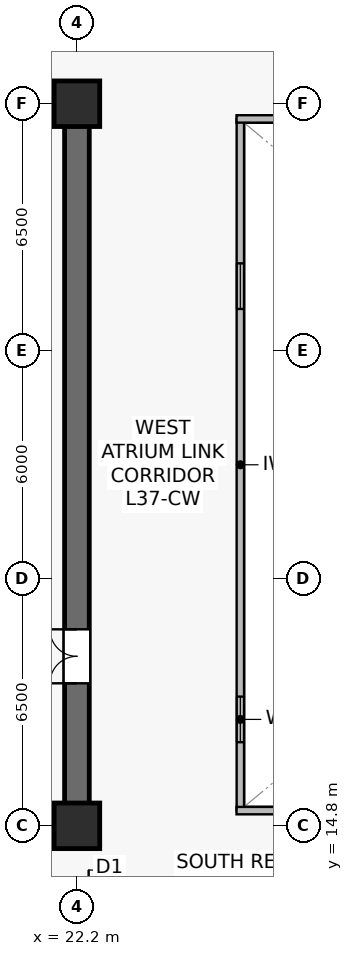
"""IFC4 building model, lengths in metres.
Left out: names, types, materials, properties, quantities, classifications, styles, units other than length and angle.
Written with IfcOpenShell. Run it as: python <this file> out.ifc"""

import sys

from ifc_helpers import new_model, si_unit, direction, frame, frame_2d, origin, origin_2d, place, context, subcontext, project, spatial, rectangle, extrude, source, transform, mapped, element, fill, save


model = new_model("IFC4")
c1 = context("Model", 3, precision=1e-05, world=origin(), true_north=direction((0.0, 1.0)))
c2 = subcontext(c1, "Body", "Model", "MODEL_VIEW")
j1 = project(units=[si_unit("LENGTHUNIT", "METRE"), si_unit("PLANEANGLEUNIT", "RADIAN")], contexts=[c1])
p1 = place(None, origin())
s1 = spatial("IfcSite", under=j1, at=p1, CompositionType="ELEMENT")
p2 = place(p1, origin())
s2 = spatial("IfcBuilding", under=s1, at=p2, CompositionType="ELEMENT")
p3 = place(p2, frame((0.0, 0.0, 154.3)))
s3 = spatial("IfcBuildingStorey", under=s2, at=p3, CompositionType="ELEMENT", Elevation=154.3)
p4 = place(p3, frame((7.075, 14.8, 0.0), z_axis=(0.0, 0.0, 1.0), x_axis=(1.0, 0.0, 0.0)))
e1 = element("IfcWall", 1, at=p4, inside=s3, PredefinedType="SHEAR", context=c2, shape_type="SweptSolid", body=[
    extrude(rectangle(XDim=15.45, YDim=0.65, at=frame_2d((7.725, 0.0))), origin(), (0.0, 0.0, 1.0), 3.79),
])
p5 = place(p3, frame((7.075, 33.8, 0.0), z_axis=(0.0, 0.0, 1.0), x_axis=(1.0, 0.0, 0.0)))
e2 = element("IfcWall", 2, at=p5, inside=s3, PredefinedType="SHEAR", context=c2, shape_type="SweptSolid", body=[
    extrude(rectangle(XDim=15.45, YDim=0.65, at=frame_2d((7.725, 0.0))), origin(), (0.0, 0.0, 1.0), 3.79),
])
p6 = place(p5, frame((5.25, 0.0, 0.0)))
e3 = element("IfcOpeningElement", 3, at=p6, cuts=e2, PredefinedType="OPENING", context=c2, shape_type="SweptSolid", body=[
    extrude(rectangle(XDim=0.95, YDim=2.15, at=frame_2d((0.475, 1.075))), frame((0.0, 0.335, 0.0), z_axis=(0.0, -1.0, 0.0), x_axis=(1.0, 0.0, 0.0)), (0.0, 0.0, 1.0), 0.67),
])
p7 = place(p5, frame((7.765, 0.0, 0.0)))
e4 = element("IfcOpeningElement", 4, at=p7, cuts=e2, PredefinedType="OPENING", context=c2, shape_type="SweptSolid", body=[
    extrude(rectangle(XDim=0.95, YDim=2.15, at=frame_2d((0.475, 1.075))), frame((0.0, 0.335, 0.0), z_axis=(0.0, -1.0, 0.0), x_axis=(1.0, 0.0, 0.0)), (0.0, 0.0, 1.0), 0.67),
])
p8 = place(p5, frame((10.315, 0.0, 0.0)))
e5 = element("IfcOpeningElement", 5, at=p8, cuts=e2, PredefinedType="OPENING", context=c2, shape_type="SweptSolid", body=[
    extrude(rectangle(XDim=0.95, YDim=2.15, at=frame_2d((0.475, 1.075))), frame((0.0, 0.335, 0.0), z_axis=(0.0, -1.0, 0.0), x_axis=(1.0, 0.0, 0.0)), (0.0, 0.0, 1.0), 0.67),
])
p9 = place(p5, frame((12.865, 0.0, 0.0)))
e6 = element("IfcOpeningElement", 6, at=p9, cuts=e2, PredefinedType="OPENING", context=c2, shape_type="SweptSolid", body=[
    extrude(rectangle(XDim=0.95, YDim=2.15, at=frame_2d((0.475, 1.075))), frame((0.0, 0.335, 0.0), z_axis=(0.0, -1.0, 0.0), x_axis=(1.0, 0.0, 0.0)), (0.0, 0.0, 1.0), 0.67),
])
p10 = place(p3, frame((22.2, 15.125, 0.0), z_axis=(0.0, 0.0, 1.0), x_axis=(0.0, 1.0, 0.0)))
e7 = element("IfcWall", 7, at=p10, inside=s3, PredefinedType="SHEAR", context=c2, shape_type="SweptSolid", body=[
    extrude(rectangle(XDim=18.35, YDim=0.65, at=frame_2d((9.175, 0.0))), origin(), (0.0, 0.0, 1.0), 3.79),
])
p11 = place(p10, frame((3.425, 0.0, 0.0)))
e8 = element("IfcOpeningElement", 8, at=p11, cuts=e7, PredefinedType="OPENING", context=c2, shape_type="SweptSolid", body=[
    extrude(rectangle(XDim=1.42, YDim=2.2, at=frame_2d((0.71, 1.1))), frame((0.0, 0.335, 0.0), z_axis=(0.0, -1.0, 0.0), x_axis=(1.0, 0.0, 0.0)), (0.0, 0.0, 1.0), 0.67),
])
m1 = source(origin(), c2, "Body", "SweptSolid", [
    extrude(rectangle(XDim=1.2, YDim=1.2, at=origin_2d()), origin(), (0.0, 0.0, 1.0), 4.1),
])
for number, where, z_axis, x_axis in (
    (9, (22.2, 14.8, 0.0), (0.0, 0.0, 1.0), (1.0, 0.0, 0.0)),
    (10, (22.2, 33.8, 0.0), (0.0, 0.0, 1.0), (1.0, 0.0, 0.0)),
):
    element("IfcColumn", number, at=place(p3, frame(where, z_axis=z_axis, x_axis=x_axis)), inside=s3, PredefinedType="COLUMN", context=c2, shape_type="MappedRepresentation", body=[
        mapped(m1, transform((0.0, 0.0, 0.0), scale=1.0)),
    ])
p12 = place(p3, frame((26.5, 15.2, 0.0), z_axis=(0.0, 0.0, 1.0), x_axis=(0.0, 1.0, 0.0)))
e11 = element("IfcWall", 11, at=p12, inside=s3, PredefinedType="SOLIDWALL", context=c2, shape_type="SweptSolid", body=[
    extrude(rectangle(XDim=18.2, YDim=0.195, at=frame_2d((9.1, 0.0))), origin(), (0.0, 0.0, 1.0), 3.79),
])
p13 = place(p12, frame((1.8, 0.0, 0.9)))
e12 = element("IfcOpeningElement", 12, at=p13, cuts=e11, PredefinedType="OPENING", context=c2, shape_type="SweptSolid", body=[
    extrude(rectangle(XDim=1.2, YDim=1.35, at=frame_2d((0.6, 0.675))), frame((0.0, 0.107, 0.0), z_axis=(0.0, -1.0, 0.0), x_axis=(1.0, 0.0, 0.0)), (0.0, 0.0, 1.0), 0.215),
])
p14 = place(p12, frame((13.2, 0.0, 0.9)))
e13 = element("IfcOpeningElement", 13, at=p14, cuts=e11, PredefinedType="OPENING", context=c2, shape_type="SweptSolid", body=[
    extrude(rectangle(XDim=1.2, YDim=1.35, at=frame_2d((0.6, 0.675))), frame((0.0, 0.107, 0.0), z_axis=(0.0, -1.0, 0.0), x_axis=(1.0, 0.0, 0.0)), (0.0, 0.0, 1.0), 0.215),
])
for number, where, z_axis, x_axis in (
    (14, (26.4, 15.2, 0.0), (0.0, 0.0, 1.0), (1.0, 0.0, 0.0)),
    (15, (26.4, 33.4, 0.0), (0.0, 0.0, 1.0), (1.0, 0.0, 0.0)),
):
    element("IfcWall", number, at=place(p3, frame(where, z_axis=z_axis, x_axis=x_axis)), inside=s3, PredefinedType="SOLIDWALL", context=c2, shape_type="SweptSolid", body=[
        extrude(rectangle(XDim=22.0, YDim=0.195, at=frame_2d((11.0, 0.0))), origin(), (0.0, 0.0, 1.0), 3.79),
    ])
m2 = source(origin(), c2, "Body", "SweptSolid", [
    extrude(rectangle(XDim=1.2, YDim=1.35, at=frame_2d((0.6, 0.675))), frame((0.0, 0.03, 0.0), z_axis=(0.0, -1.0, 0.0), x_axis=(1.0, 0.0, 0.0)), (0.0, 0.0, 1.0), 0.06),
])
p15 = place(p13, origin())
e16 = element("IfcWindow", 16, at=p15, inside=s3, PartitioningType="SINGLE_PANEL", PredefinedType="WINDOW", context=c2, shape_type="MappedRepresentation", body=[
    mapped(m2, transform((0.0, 0.0, 0.0), scale=1.0)),
])
fill(e12, e16)
p16 = place(p14, origin())
e17 = element("IfcWindow", 17, at=p16, inside=s3, PartitioningType="SINGLE_PANEL", PredefinedType="WINDOW", context=c2, shape_type="MappedRepresentation", body=[
    mapped(m2, transform((0.0, 0.0, 0.0), scale=1.0)),
])
fill(e13, e17)
m3 = source(origin(), c2, "Body", "SweptSolid", [
    extrude(rectangle(XDim=1.42, YDim=2.2, at=frame_2d((0.71, 1.1))), frame((0.0, 0.025, 0.0), z_axis=(0.0, -1.0, 0.0), x_axis=(1.0, 0.0, 0.0)), (0.0, 0.0, 1.0), 0.05),
])
p17 = place(p11, origin())
e18 = element("IfcDoor", 18, at=p17, inside=s3, OperationType="DOUBLE_DOOR_SINGLE_SWING", PredefinedType="DOOR", context=c2, shape_type="MappedRepresentation", body=[
    mapped(m3, transform((0.0, 0.0, 0.0), scale=1.0)),
])
fill(e8, e18)
save(model, sys.argv[1])
